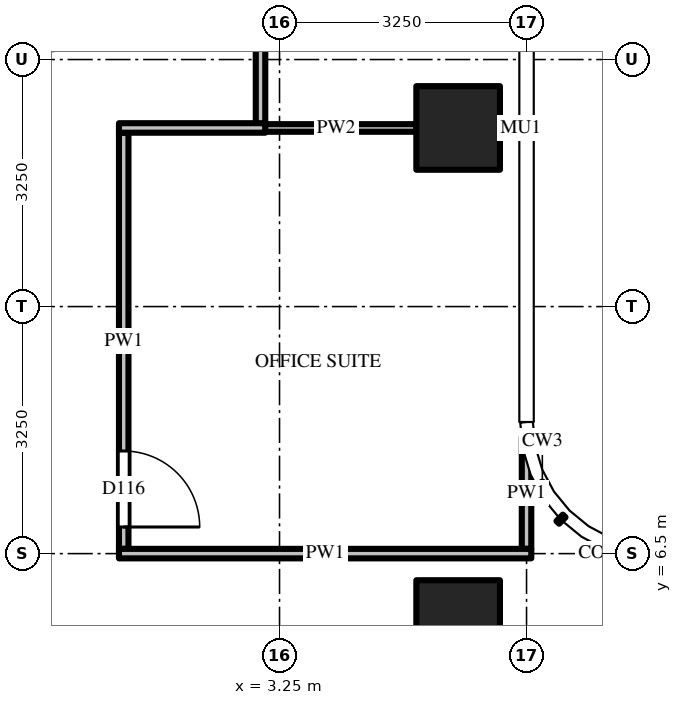
"""IFC4 building model, lengths in metres.
Left out: names, types, materials, properties, quantities, classifications, styles, units other than length and angle.
Written with IfcOpenShell. Run it as: python <this file> out.ifc"""

import sys

from ifc_helpers import new_model, si_unit, direction, frame, frame_2d, origin, origin_2d, place, context, subcontext, project, spatial, rectangle, extrude, source, transform, mapped, element, fill, save


model = new_model("IFC4")
c1 = context("Model", 3, precision=1e-05, world=origin(), true_north=direction((0.0, 1.0)))
c2 = subcontext(c1, "Body", "Model", "MODEL_VIEW")
j1 = project(units=[si_unit("LENGTHUNIT", "METRE"), si_unit("PLANEANGLEUNIT", "RADIAN")], contexts=[c1])
p1 = place(None, origin())
s1 = spatial("IfcSite", under=j1, at=p1, CompositionType="ELEMENT")
p2 = place(p1, origin())
s2 = spatial("IfcBuilding", under=s1, at=p2, CompositionType="ELEMENT")
p3 = place(p2, frame((0.0, 0.0, 267.5)))
s3 = spatial("IfcBuildingStorey", under=s2, at=p3, CompositionType="ELEMENT", Elevation=267.5)
m1 = source(origin(), c2, "Body", "SweptSolid", [
    extrude(rectangle(XDim=1.1, YDim=1.1, at=origin_2d()), origin(), (0.0, 0.0, 1.0), 3.9),
])
for number, where, z_axis, x_axis in (
    (1, (5.6, 12.1, 0.0), (0.0, 0.0, 1.0), (1.0, 0.0, 0.0)),
    (2, (5.6, 5.6, 0.0), (0.0, 0.0, 1.0), (1.0, 0.0, 0.0)),
):
    element("IfcColumn", number, at=place(p3, frame(where, z_axis=z_axis, x_axis=x_axis)), inside=s3, PredefinedType="COLUMN", context=c2, shape_type="MappedRepresentation", body=[
        mapped(m1, transform((0.0, 0.0, 0.0))),
    ])
m2 = source(origin(), c2, "Body", "SweptSolid", [
    extrude(rectangle(XDim=5.475, YDim=0.125, at=frame_2d((2.738, 0.0))), origin(), (0.0, 0.0, 1.0), 2.668),
])
p4 = place(p3, frame((1.2, 12.038, 0.0), z_axis=(0.0, 0.0, 1.0), x_axis=(0.0, -1.0, 0.0)))
e3 = element("IfcWall", 3, at=p4, inside=s3, PredefinedType="PARTITIONING", context=c2, shape_type="MappedRepresentation", body=[
    mapped(m2, transform((0.0, 0.0, 0.0))),
])
m3 = source(origin(), c2, "Body", "SweptSolid", [
    extrude(rectangle(XDim=1.0, YDim=2.1, at=frame_2d((0.5, 1.05))), frame((0.0, 0.073, 0.0), z_axis=(0.0, -1.0, 0.0), x_axis=(1.0, 0.0, 0.0)), (0.0, 0.0, 1.0), 0.145),
])
p5 = place(p4, frame((4.188, 0.0, 0.0)))
e4 = element("IfcOpeningElement", 4, at=p5, cuts=e3, PredefinedType="OPENING", context=c2, shape_type="MappedRepresentation", body=[
    mapped(m3, transform((0.0, 0.0, 0.0))),
])
m4 = source(origin(), c2, "Body", "SweptSolid", [
    extrude(rectangle(XDim=8.788, YDim=0.125, at=frame_2d((4.394, 0.0))), origin(), (0.0, 0.0, 1.0), 2.53),
])
p6 = place(p3, frame((3.0, 20.938, 0.0), z_axis=(0.0, 0.0, 1.0), x_axis=(0.0, -1.0, 0.0)))
e5 = element("IfcWall", 5, at=p6, inside=s3, PredefinedType="PARTITIONING", context=c2, shape_type="MappedRepresentation", body=[
    mapped(m4, transform((0.0, 0.0, 0.0))),
])
p7 = place(p6, frame((1.788, 0.0, 0.0)))
e6 = element("IfcOpeningElement", 6, at=p7, cuts=e5, PredefinedType="OPENING", context=c2, shape_type="MappedRepresentation", body=[
    mapped(m3, transform((0.0, 0.0, 0.0))),
])
m5 = source(origin(), c2, "Body", "SweptSolid", [
    extrude(rectangle(XDim=1.469, YDim=0.125, at=frame_2d((0.734, 0.0))), origin(), (0.0, 0.0, 1.0), 3.45),
])
p8 = place(p3, frame((6.5, 6.562, 0.0), z_axis=(0.0, 0.0, 1.0), x_axis=(0.0, 1.0, 0.0)))
e7 = element("IfcWall", 7, at=p8, inside=s3, PredefinedType="PARTITIONING", context=c2, shape_type="MappedRepresentation", body=[
    mapped(m5, transform((0.0, 0.0, 0.0))),
])
m6 = source(origin(), c2, "Body", "SweptSolid", [
    extrude(rectangle(XDim=5.425, YDim=0.125, at=frame_2d((2.712, 0.0))), origin(), (0.0, 0.0, 1.0), 2.53),
])
p9 = place(p3, frame((1.137, 6.5, 0.0), z_axis=(0.0, 0.0, 1.0), x_axis=(1.0, 0.0, 0.0)))
e8 = element("IfcWall", 8, at=p9, inside=s3, PredefinedType="PARTITIONING", context=c2, shape_type="MappedRepresentation", body=[
    mapped(m6, transform((0.0, 0.0, 0.0))),
])
m7 = source(origin(), c2, "Body", "SweptSolid", [
    extrude(rectangle(XDim=2.113, YDim=0.1, at=frame_2d((1.056, 0.0))), origin(), (0.0, 0.0, 1.0), 2.668),
])
p10 = place(p3, frame((2.938, 12.1, 0.0), z_axis=(0.0, 0.0, 1.0), x_axis=(1.0, 0.0, 0.0)))
e9 = element("IfcWall", 9, at=p10, inside=s3, PredefinedType="PARTITIONING", context=c2, shape_type="MappedRepresentation", body=[
    mapped(m7, transform((0.0, 0.0, 0.0))),
])
m8 = source(origin(), c2, "Body", "SweptSolid", [
    extrude(rectangle(XDim=1.925, YDim=0.125, at=frame_2d((0.962, 0.0))), origin(), (0.0, 0.0, 1.0), 2.668),
])
p11 = place(p3, frame((3.062, 12.1, 0.0), z_axis=(0.0, 0.0, 1.0), x_axis=(-1.0, 0.0, 0.0)))
e10 = element("IfcWall", 10, at=p11, inside=s3, PredefinedType="PARTITIONING", context=c2, shape_type="MappedRepresentation", body=[
    mapped(m8, transform((0.0, 0.0, 0.0))),
])
m9 = source(origin(), c2, "Body", "SweptSolid", [
    extrude(rectangle(XDim=1.0, YDim=2.1, at=frame_2d((0.5, 1.05))), frame((0.0, 0.025, 0.0), z_axis=(0.0, -1.0, 0.0), x_axis=(1.0, 0.0, 0.0)), (0.0, 0.0, 1.0), 0.05),
])
p12 = place(p5, origin())
e11 = element("IfcDoor", 11, at=p12, inside=s3, OperationType="SINGLE_SWING_RIGHT", PredefinedType="DOOR", context=c2, shape_type="MappedRepresentation", body=[
    mapped(m9, transform((0.0, 0.0, 0.0))),
])
fill(e4, e11)
save(model, sys.argv[1])
